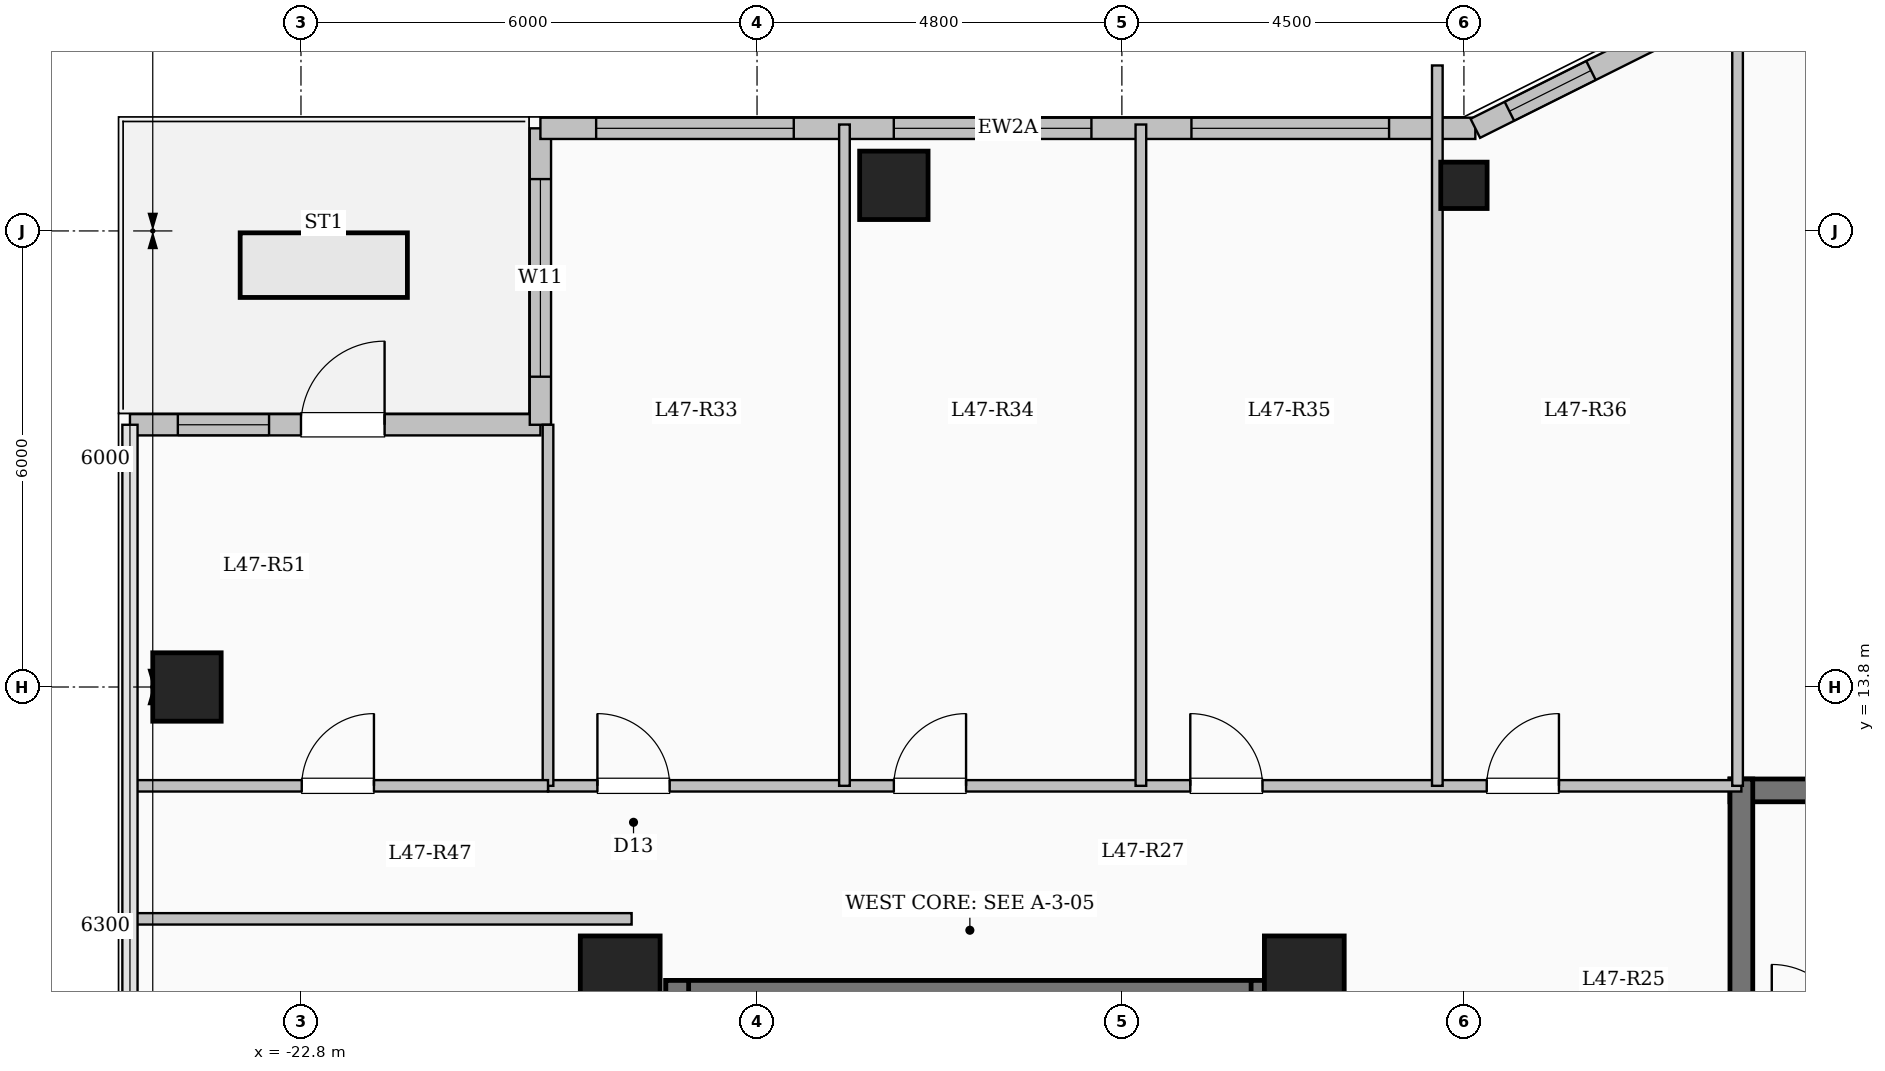
"""IFC4 building model, lengths in metres.
Left out: names, types, materials, properties, quantities, classifications, styles, units other than length and angle.
Written with IfcOpenShell. Run it as: python <this file> out.ifc"""

import sys

from ifc_helpers import new_model, si_unit, direction, frame, frame_2d, origin, origin_2d, place, context, subcontext, project, spatial, rectangle, hollow_circle, extrude, element, fill, save


model = new_model("IFC4")
c1 = context("Model", 3, precision=1e-05, world=origin(), true_north=direction((0.0, 1.0)))
c2 = subcontext(c1, "Body", "Model", "MODEL_VIEW")
j1 = project(units=[si_unit("LENGTHUNIT", "METRE"), si_unit("PLANEANGLEUNIT", "RADIAN")], contexts=[c1])
p1 = place(None, origin())
s1 = spatial("IfcSite", under=j1, at=p1, CompositionType="ELEMENT")
p2 = place(p1, origin())
s2 = spatial("IfcBuilding", under=s1, at=p2, CompositionType="ELEMENT")
p3 = place(p2, frame((0.0, 0.0, 172.8)))
s3 = spatial("IfcBuildingStorey", under=s2, at=p3, CompositionType="ELEMENT", Elevation=172.8)
for number, where, z_axis, x_axis in (
    (1, (-9.6, 10.0, 0.0), (0.0, 0.0, 1.0), (1.0, 0.0, 0.0)),
    (2, (-18.6, 10.0, 0.0), (0.0, 0.0, 1.0), (1.0, 0.0, 0.0)),
):
    element("IfcColumn", number, at=place(p3, frame(where, z_axis=z_axis, x_axis=x_axis)), inside=s3, PredefinedType="COLUMN", context=c2, shape_type="SweptSolid", body=[
        extrude(rectangle(XDim=1.05, YDim=1.05, at=origin_2d()), origin(), (0.0, 0.0, 1.0), 4.5),
    ])
p4 = place(p3, frame((-15.0, 20.4, 0.0), z_axis=(0.0, 0.0, 1.0), x_axis=(1.0, 0.0, 0.0)))
e3 = element("IfcColumn", 3, at=p4, inside=s3, PredefinedType="COLUMN", context=c2, shape_type="SweptSolid", body=[
    extrude(rectangle(XDim=0.9, YDim=0.9, at=origin_2d()), origin(), (0.0, 0.0, 1.0), 4.5),
])
p5 = place(p3, frame((-7.5, 20.4, 0.0), z_axis=(0.0, 0.0, 1.0), x_axis=(1.0, 0.0, 0.0)))
e4 = element("IfcColumn", 4, at=p5, inside=s3, PredefinedType="COLUMN", context=c2, shape_type="SweptSolid", body=[
    extrude(hollow_circle(Radius=0.305, WallThickness=0.025, at=origin_2d()), origin(), (0.0, 0.0, 1.0), 4.5),
])
p6 = place(p3, frame((-24.3, 13.8, 0.0), z_axis=(0.0, 0.0, 1.0), x_axis=(1.0, 0.0, 0.0)))
e5 = element("IfcColumn", 5, at=p6, inside=s3, PredefinedType="COLUMN", context=c2, shape_type="SweptSolid", body=[
    extrude(rectangle(XDim=0.9, YDim=0.9, at=origin_2d()), origin(), (0.0, 0.0, 1.0), 4.5),
])
p7 = place(p3, frame((-25.05, 17.25, 0.0), z_axis=(0.0, 0.0, 1.0), x_axis=(1.0, 0.0, 0.0)))
e6 = element("IfcWall", 6, at=p7, inside=s3, PredefinedType="SOLIDWALL", context=c2, shape_type="SweptSolid", body=[
    extrude(rectangle(XDim=5.4, YDim=0.28, at=frame_2d((2.7, 0.0))), origin(), (0.0, 0.0, 1.0), 4.2),
])
p8 = place(p7, frame((2.25, 0.0, 0.0)))
e7 = element("IfcOpeningElement", 7, at=p8, cuts=e6, PredefinedType="OPENING", context=c2, shape_type="SweptSolid", body=[
    extrude(rectangle(XDim=1.1, YDim=2.2, at=frame_2d((0.55, 1.1))), frame((0.0, 0.15, 0.0), z_axis=(0.0, -1.0, 0.0), x_axis=(1.0, 0.0, 0.0)), (0.0, 0.0, 1.0), 0.3),
])
p9 = place(p7, frame((0.63, 0.0, 0.95)))
e8 = element("IfcOpeningElement", 8, at=p9, cuts=e6, PredefinedType="OPENING", context=c2, shape_type="SweptSolid", body=[
    extrude(rectangle(XDim=1.2, YDim=1.5, at=frame_2d((0.6, 0.75))), frame((0.0, 0.15, 0.0), z_axis=(0.0, -1.0, 0.0), x_axis=(1.0, 0.0, 0.0)), (0.0, 0.0, 1.0), 0.3),
])
p10 = place(p3, frame((-19.65, 17.25, 0.0), z_axis=(0.0, 0.0, 1.0), x_axis=(0.0, 1.0, 0.0)))
e9 = element("IfcWall", 9, at=p10, inside=s3, PredefinedType="SOLIDWALL", context=c2, shape_type="SweptSolid", body=[
    extrude(rectangle(XDim=3.9, YDim=0.28, at=frame_2d((1.95, 0.0))), origin(), (0.0, 0.0, 1.0), 4.2),
])
p11 = place(p10, frame((0.632, 0.0, 0.85)))
e10 = element("IfcOpeningElement", 10, at=p11, cuts=e9, PredefinedType="OPENING", context=c2, shape_type="SweptSolid", body=[
    extrude(rectangle(XDim=2.6, YDim=2.4, at=frame_2d((1.3, 1.2))), frame((0.0, 0.15, 0.0), z_axis=(0.0, -1.0, 0.0), x_axis=(1.0, 0.0, 0.0)), (0.0, 0.0, 1.0), 0.3),
])
p12 = place(p3, frame((-19.65, 21.15, 0.0), z_axis=(0.0, 0.0, 1.0), x_axis=(1.0, 0.0, 0.0)))
e11 = element("IfcWall", 11, at=p12, inside=s3, PredefinedType="SOLIDWALL", context=c2, shape_type="SweptSolid", body=[
    extrude(rectangle(XDim=12.3, YDim=0.28, at=frame_2d((6.15, 0.0))), origin(), (0.0, 0.0, 1.0), 4.2),
])
p13 = place(p12, frame((0.733, 0.0, 0.85)))
e12 = element("IfcOpeningElement", 12, at=p13, cuts=e11, PredefinedType="OPENING", context=c2, shape_type="SweptSolid", body=[
    extrude(rectangle(XDim=2.6, YDim=2.4, at=frame_2d((1.3, 1.2))), frame((0.0, 0.15, 0.0), z_axis=(0.0, -1.0, 0.0), x_axis=(1.0, 0.0, 0.0)), (0.0, 0.0, 1.0), 0.3),
])
p14 = place(p12, frame((4.649, 0.0, 0.85)))
e13 = element("IfcOpeningElement", 13, at=p14, cuts=e11, PredefinedType="OPENING", context=c2, shape_type="SweptSolid", body=[
    extrude(rectangle(XDim=2.6, YDim=2.4, at=frame_2d((1.3, 1.2))), frame((0.0, 0.15, 0.0), z_axis=(0.0, -1.0, 0.0), x_axis=(1.0, 0.0, 0.0)), (0.0, 0.0, 1.0), 0.3),
])
p15 = place(p12, frame((8.565, 0.0, 0.85)))
e14 = element("IfcOpeningElement", 14, at=p15, cuts=e11, PredefinedType="OPENING", context=c2, shape_type="SweptSolid", body=[
    extrude(rectangle(XDim=2.6, YDim=2.4, at=frame_2d((1.3, 1.2))), frame((0.0, 0.15, 0.0), z_axis=(0.0, -1.0, 0.0), x_axis=(1.0, 0.0, 0.0)), (0.0, 0.0, 1.0), 0.3),
])
p16 = place(p3, frame((-7.35, 21.15, 0.0), z_axis=(0.0, 0.0, 1.0), x_axis=(0.894427191, 0.4472135955, 0.0)))
e15 = element("IfcWall", 15, at=p16, inside=s3, PredefinedType="SOLIDWALL", context=c2, shape_type="SweptSolid", body=[
    extrude(rectangle(XDim=3.354, YDim=0.28, at=frame_2d((1.677, 0.0))), origin(), (0.0, 0.0, 1.0), 4.2),
])
p17 = place(p16, frame((0.501, 0.0, 0.95)))
e16 = element("IfcOpeningElement", 16, at=p17, cuts=e15, PredefinedType="OPENING", context=c2, shape_type="SweptSolid", body=[
    extrude(rectangle(XDim=1.2, YDim=1.5, at=frame_2d((0.6, 0.75))), frame((0.0, 0.15, 0.0), z_axis=(0.0, -1.0, 0.0), x_axis=(1.0, 0.0, 0.0)), (0.0, 0.0, 1.0), 0.3),
])
p18 = place(p3, frame((-18.0, 9.79, 0.0), z_axis=(0.0, 0.0, 1.0), x_axis=(1.0, 0.0, 0.0)))
e17 = element("IfcWall", 17, at=p18, inside=s3, PredefinedType="SHEAR", context=c2, shape_type="SweptSolid", body=[
    extrude(rectangle(XDim=8.0, YDim=0.3, at=frame_2d((4.0, 0.0))), origin(), (0.0, 0.0, 1.0), 4.5),
])
for number, where, z_axis, x_axis in (
    (18, (-17.85, 6.35, 0.0), (0.0, 0.0, 1.0), (0.0, 1.0, 0.0)),
    (19, (-10.15, 6.35, 0.0), (0.0, 0.0, 1.0), (0.0, 1.0, 0.0)),
):
    element("IfcWall", number, at=place(p3, frame(where, z_axis=z_axis, x_axis=x_axis)), inside=s3, PredefinedType="SHEAR", context=c2, shape_type="SweptSolid", body=[
        extrude(rectangle(XDim=3.59, YDim=0.3, at=frame_2d((1.795, 0.0))), origin(), (0.0, 0.0, 1.0), 4.5),
    ])
p19 = place(p3, frame((-4.0, 12.44, 0.0), z_axis=(0.0, 0.0, 1.0), x_axis=(1.0, 0.0, 0.0)))
e20 = element("IfcWall", 20, at=p19, inside=s3, PredefinedType="SHEAR", context=c2, shape_type="SweptSolid", body=[
    extrude(rectangle(XDim=8.0, YDim=0.3, at=frame_2d((4.0, 0.0))), origin(), (0.0, 0.0, 1.0), 4.5),
])
p20 = place(p3, frame((-3.85, 9.0, 0.0), z_axis=(0.0, 0.0, 1.0), x_axis=(0.0, 1.0, 0.0)))
e21 = element("IfcWall", 21, at=p20, inside=s3, PredefinedType="SHEAR", context=c2, shape_type="SweptSolid", body=[
    extrude(rectangle(XDim=3.59, YDim=0.3, at=frame_2d((1.795, 0.0))), origin(), (0.0, 0.0, 1.0), 4.5),
])
p21 = place(p3, frame((-19.55, 12.5, 0.0), z_axis=(0.0, 0.0, 1.0), x_axis=(1.0, 0.0, 0.0)))
e22 = element("IfcWall", 22, at=p21, inside=s3, PredefinedType="PARTITIONING", context=c2, shape_type="SweptSolid", body=[
    extrude(rectangle(XDim=15.7, YDim=0.15, at=frame_2d((7.85, 0.0))), origin(), (0.0, 0.0, 1.0), 4.2),
])
p22 = place(p21, frame((0.65, 0.0, 0.0)))
e23 = element("IfcOpeningElement", 23, at=p22, cuts=e22, PredefinedType="OPENING", context=c2, shape_type="SweptSolid", body=[
    extrude(rectangle(XDim=0.95, YDim=2.15, at=frame_2d((0.475, 1.075))), frame((0.0, 0.085, 0.0), z_axis=(0.0, -1.0, 0.0), x_axis=(1.0, 0.0, 0.0)), (0.0, 0.0, 1.0), 0.17),
])
p23 = place(p21, frame((4.55, 0.0, 0.0)))
e24 = element("IfcOpeningElement", 24, at=p23, cuts=e22, PredefinedType="OPENING", context=c2, shape_type="SweptSolid", body=[
    extrude(rectangle(XDim=0.95, YDim=2.15, at=frame_2d((0.475, 1.075))), frame((0.0, 0.085, 0.0), z_axis=(0.0, -1.0, 0.0), x_axis=(1.0, 0.0, 0.0)), (0.0, 0.0, 1.0), 0.17),
])
p24 = place(p21, frame((8.45, 0.0, 0.0)))
e25 = element("IfcOpeningElement", 25, at=p24, cuts=e22, PredefinedType="OPENING", context=c2, shape_type="SweptSolid", body=[
    extrude(rectangle(XDim=0.95, YDim=2.15, at=frame_2d((0.475, 1.075))), frame((0.0, 0.085, 0.0), z_axis=(0.0, -1.0, 0.0), x_axis=(1.0, 0.0, 0.0)), (0.0, 0.0, 1.0), 0.17),
])
p25 = place(p21, frame((12.35, 0.0, 0.0)))
e26 = element("IfcOpeningElement", 26, at=p25, cuts=e22, PredefinedType="OPENING", context=c2, shape_type="SweptSolid", body=[
    extrude(rectangle(XDim=0.95, YDim=2.15, at=frame_2d((0.475, 1.075))), frame((0.0, 0.085, 0.0), z_axis=(0.0, -1.0, 0.0), x_axis=(1.0, 0.0, 0.0)), (0.0, 0.0, 1.0), 0.17),
])
p26 = place(p3, frame((-3.9, 12.5, 0.0), z_axis=(0.0, 0.0, 1.0), x_axis=(0.0, 1.0, 0.0)))
e27 = element("IfcWall", 27, at=p26, inside=s3, PredefinedType="PARTITIONING", context=c2, shape_type="SweptSolid", body=[
    extrude(rectangle(XDim=10.18, YDim=0.14, at=frame_2d((5.09, 0.0))), origin(), (0.0, 0.0, 1.0), 4.2),
])
for number, where, z_axis, x_axis in (
    (28, (-15.65, 12.5, 0.0), (0.0, 0.0, 1.0), (0.0, 1.0, 0.0)),
    (29, (-11.75, 12.5, 0.0), (0.0, 0.0, 1.0), (0.0, 1.0, 0.0)),
):
    element("IfcWall", number, at=place(p3, frame(where, z_axis=z_axis, x_axis=x_axis)), inside=s3, PredefinedType="PARTITIONING", context=c2, shape_type="SweptSolid", body=[
        extrude(rectangle(XDim=8.7, YDim=0.14, at=frame_2d((4.35, 0.0))), origin(), (0.0, 0.0, 1.0), 4.2),
    ])
p27 = place(p3, frame((-7.85, 12.5, 0.0), z_axis=(0.0, 0.0, 1.0), x_axis=(0.0, 1.0, 0.0)))
e30 = element("IfcWall", 30, at=p27, inside=s3, PredefinedType="PARTITIONING", context=c2, shape_type="SweptSolid", body=[
    extrude(rectangle(XDim=9.477, YDim=0.14, at=frame_2d((4.739, 0.0))), origin(), (0.0, 0.0, 1.0), 3.685),
])
p28 = place(p3, frame((-25.08, 10.75, 0.0), z_axis=(0.0, 0.0, 1.0), x_axis=(1.0, 0.0, 0.0)))
e31 = element("IfcWall", 31, at=p28, inside=s3, PredefinedType="PARTITIONING", context=c2, shape_type="SweptSolid", body=[
    extrude(rectangle(XDim=6.63, YDim=0.15, at=frame_2d((3.315, 0.0))), origin(), (0.0, 0.0, 1.0), 4.2),
])
p29 = place(p3, frame((-19.55, 12.5, 0.0), z_axis=(0.0, 0.0, 1.0), x_axis=(0.0, 1.0, 0.0)))
e32 = element("IfcWall", 32, at=p29, inside=s3, PredefinedType="PARTITIONING", context=c2, shape_type="SweptSolid", body=[
    extrude(rectangle(XDim=4.75, YDim=0.14, at=frame_2d((2.375, 0.0))), origin(), (0.0, 0.0, 1.0), 4.2),
])
p30 = place(p3, frame((-25.08, 12.5, 0.0), z_axis=(0.0, 0.0, 1.0), x_axis=(1.0, 0.0, 0.0)))
e33 = element("IfcWall", 33, at=p30, inside=s3, PredefinedType="PARTITIONING", context=c2, shape_type="SweptSolid", body=[
    extrude(rectangle(XDim=5.53, YDim=0.15, at=frame_2d((2.765, 0.0))), origin(), (0.0, 0.0, 1.0), 4.2),
])
p31 = place(p30, frame((2.29, 0.0, 0.0)))
e34 = element("IfcOpeningElement", 34, at=p31, cuts=e33, PredefinedType="OPENING", context=c2, shape_type="SweptSolid", body=[
    extrude(rectangle(XDim=0.95, YDim=2.15, at=frame_2d((0.475, 1.075))), frame((0.0, 0.085, 0.0), z_axis=(0.0, -1.0, 0.0), x_axis=(1.0, 0.0, 0.0)), (0.0, 0.0, 1.0), 0.17),
])
p32 = place(p8, origin())
e35 = element("IfcDoor", 35, at=p32, inside=s3, OperationType="SINGLE_SWING_RIGHT", PredefinedType="DOOR", context=c2, shape_type="SweptSolid", body=[
    extrude(rectangle(XDim=1.1, YDim=2.2, at=frame_2d((0.55, 1.1))), frame((0.0, 0.025, 0.0), z_axis=(0.0, -1.0, 0.0), x_axis=(1.0, 0.0, 0.0)), (0.0, 0.0, 1.0), 0.05),
])
fill(e7, e35)
p33 = place(p9, origin())
e36 = element("IfcWindow", 36, at=p33, inside=s3, PartitioningType="SINGLE_PANEL", PredefinedType="WINDOW", context=c2, shape_type="SweptSolid", body=[
    extrude(rectangle(XDim=1.2, YDim=1.5, at=frame_2d((0.6, 0.75))), frame((0.0, 0.03, 0.0), z_axis=(0.0, -1.0, 0.0), x_axis=(1.0, 0.0, 0.0)), (0.0, 0.0, 1.0), 0.06),
])
fill(e8, e36)
p34 = place(p11, origin())
e37 = element("IfcWindow", 37, at=p34, inside=s3, PartitioningType="SINGLE_PANEL", PredefinedType="WINDOW", context=c2, shape_type="SweptSolid", body=[
    extrude(rectangle(XDim=2.6, YDim=2.4, at=frame_2d((1.3, 1.2))), frame((0.0, 0.03, 0.0), z_axis=(0.0, -1.0, 0.0), x_axis=(1.0, 0.0, 0.0)), (0.0, 0.0, 1.0), 0.06),
])
fill(e10, e37)
p35 = place(p13, origin())
e38 = element("IfcWindow", 38, at=p35, inside=s3, PartitioningType="SINGLE_PANEL", PredefinedType="WINDOW", context=c2, shape_type="SweptSolid", body=[
    extrude(rectangle(XDim=2.6, YDim=2.4, at=frame_2d((1.3, 1.2))), frame((0.0, 0.03, 0.0), z_axis=(0.0, -1.0, 0.0), x_axis=(1.0, 0.0, 0.0)), (0.0, 0.0, 1.0), 0.06),
])
fill(e12, e38)
p36 = place(p14, origin())
e39 = element("IfcWindow", 39, at=p36, inside=s3, PartitioningType="SINGLE_PANEL", PredefinedType="WINDOW", context=c2, shape_type="SweptSolid", body=[
    extrude(rectangle(XDim=2.6, YDim=2.4, at=frame_2d((1.3, 1.2))), frame((0.0, 0.03, 0.0), z_axis=(0.0, -1.0, 0.0), x_axis=(1.0, 0.0, 0.0)), (0.0, 0.0, 1.0), 0.06),
])
fill(e13, e39)
p37 = place(p15, origin())
e40 = element("IfcWindow", 40, at=p37, inside=s3, PartitioningType="SINGLE_PANEL", PredefinedType="WINDOW", context=c2, shape_type="SweptSolid", body=[
    extrude(rectangle(XDim=2.6, YDim=2.4, at=frame_2d((1.3, 1.2))), frame((0.0, 0.03, 0.0), z_axis=(0.0, -1.0, 0.0), x_axis=(1.0, 0.0, 0.0)), (0.0, 0.0, 1.0), 0.06),
])
fill(e14, e40)
p38 = place(p17, origin())
e41 = element("IfcWindow", 41, at=p38, inside=s3, PartitioningType="SINGLE_PANEL", PredefinedType="WINDOW", context=c2, shape_type="SweptSolid", body=[
    extrude(rectangle(XDim=1.2, YDim=1.5, at=frame_2d((0.6, 0.75))), frame((0.0, 0.03, 0.0), z_axis=(0.0, -1.0, 0.0), x_axis=(1.0, 0.0, 0.0)), (0.0, 0.0, 1.0), 0.06),
])
fill(e16, e41)
p39 = place(p22, origin())
e42 = element("IfcDoor", 42, at=p39, inside=s3, OperationType="SINGLE_SWING_LEFT", PredefinedType="DOOR", context=c2, shape_type="SweptSolid", body=[
    extrude(rectangle(XDim=0.95, YDim=2.15, at=frame_2d((0.475, 1.075))), frame((0.0, 0.025, 0.0), z_axis=(0.0, -1.0, 0.0), x_axis=(1.0, 0.0, 0.0)), (0.0, 0.0, 1.0), 0.05),
])
fill(e23, e42)
p40 = place(p23, origin())
e43 = element("IfcDoor", 43, at=p40, inside=s3, OperationType="SINGLE_SWING_RIGHT", PredefinedType="DOOR", context=c2, shape_type="SweptSolid", body=[
    extrude(rectangle(XDim=0.95, YDim=2.15, at=frame_2d((0.475, 1.075))), frame((0.0, 0.025, 0.0), z_axis=(0.0, -1.0, 0.0), x_axis=(1.0, 0.0, 0.0)), (0.0, 0.0, 1.0), 0.05),
])
fill(e24, e43)
p41 = place(p24, origin())
e44 = element("IfcDoor", 44, at=p41, inside=s3, OperationType="SINGLE_SWING_LEFT", PredefinedType="DOOR", context=c2, shape_type="SweptSolid", body=[
    extrude(rectangle(XDim=0.95, YDim=2.15, at=frame_2d((0.475, 1.075))), frame((0.0, 0.025, 0.0), z_axis=(0.0, -1.0, 0.0), x_axis=(1.0, 0.0, 0.0)), (0.0, 0.0, 1.0), 0.05),
])
fill(e25, e44)
p42 = place(p25, origin())
e45 = element("IfcDoor", 45, at=p42, inside=s3, OperationType="SINGLE_SWING_RIGHT", PredefinedType="DOOR", context=c2, shape_type="SweptSolid", body=[
    extrude(rectangle(XDim=0.95, YDim=2.15, at=frame_2d((0.475, 1.075))), frame((0.0, 0.025, 0.0), z_axis=(0.0, -1.0, 0.0), x_axis=(1.0, 0.0, 0.0)), (0.0, 0.0, 1.0), 0.05),
])
fill(e26, e45)
p43 = place(p31, origin())
e46 = element("IfcDoor", 46, at=p43, inside=s3, OperationType="SINGLE_SWING_RIGHT", PredefinedType="DOOR", context=c2, shape_type="SweptSolid", body=[
    extrude(rectangle(XDim=0.95, YDim=2.15, at=frame_2d((0.475, 1.075))), frame((0.0, 0.025, 0.0), z_axis=(0.0, -1.0, 0.0), x_axis=(1.0, 0.0, 0.0)), (0.0, 0.0, 1.0), 0.05),
])
fill(e34, e46)
save(model, sys.argv[1])
